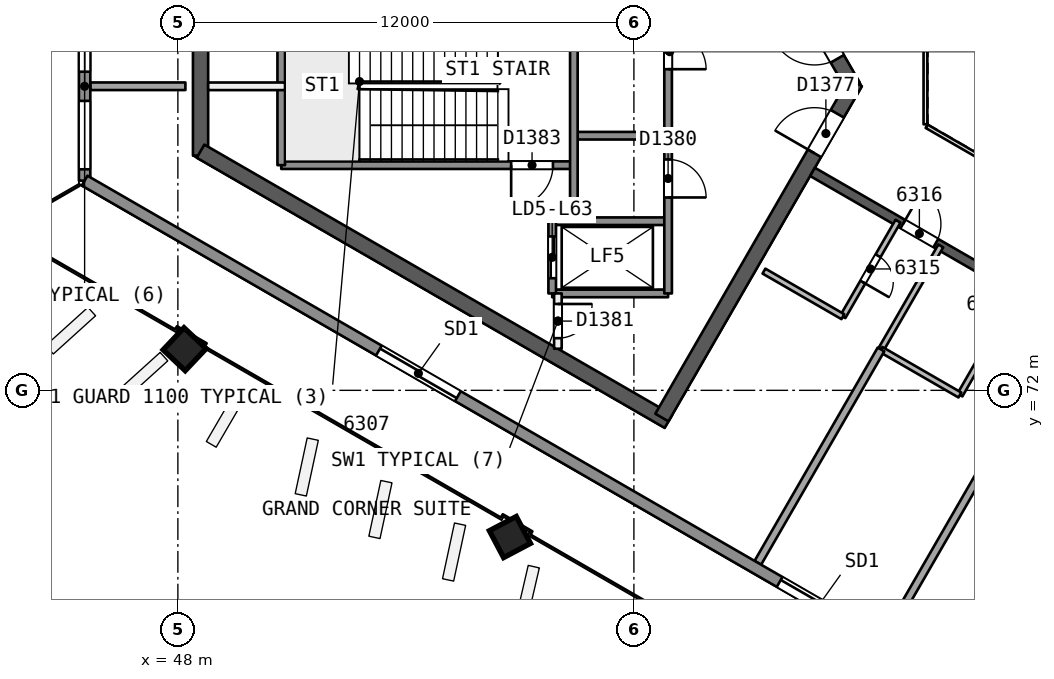
"""IFC4 building model, lengths in metres.
Left out: names, types, materials, properties, quantities, classifications, styles, units other than length and angle.
Written with IfcOpenShell. Run it as: python <this file> out.ifc"""

import sys

from ifc_helpers import new_model, si_unit, direction, frame, frame_2d, origin, origin_2d, place, context, subcontext, project, spatial, rectangle, extrude, element, fill, save


model = new_model("IFC4")
c1 = context("Model", 3, precision=1e-05, world=origin(), true_north=direction((0.0, 1.0)))
c2 = subcontext(c1, "Body", "Model", "MODEL_VIEW")
j1 = project(units=[si_unit("LENGTHUNIT", "METRE"), si_unit("PLANEANGLEUNIT", "RADIAN")], contexts=[c1])
p1 = place(None, origin())
s1 = spatial("IfcSite", under=j1, at=p1, CompositionType="ELEMENT")
p2 = place(p1, origin())
s2 = spatial("IfcBuilding", under=s1, at=p2, CompositionType="ELEMENT")
p3 = place(p2, frame((0.0, 0.0, 259.0)))
s3 = spatial("IfcBuildingStorey", under=s2, at=p3, CompositionType="ELEMENT", Elevation=259.0)
p4 = place(p3, frame((65.769, 80.0, 0.0), z_axis=(0.0, 0.0, 1.0), x_axis=(-0.50000177223, 0.866024380585, 0.0)))
e1 = element("IfcWall", 1, at=p4, inside=s3, PredefinedType="SHEAR", context=c2, shape_type="SweptSolid", body=[
    extrude(rectangle(XDim=10.265, YDim=0.4, at=frame_2d((5.132, 0.0))), origin(), (0.0, 0.0, 1.0), 3.7),
])
p5 = place(p4, frame((0.834, 0.0, 0.0)))
e2 = element("IfcOpeningElement", 2, at=p5, cuts=e1, PredefinedType="OPENING", context=c2, shape_type="SweptSolid", body=[
    extrude(rectangle(XDim=1.2, YDim=2.1, at=frame_2d((0.6, 1.05))), frame((0.0, 0.21, 0.0), z_axis=(0.0, -1.0, 0.0), x_axis=(1.0, 0.0, 0.0)), (0.0, 0.0, 1.0), 0.421),
])
p6 = place(p3, frame((48.597, 81.707, 0.0), z_axis=(0.0, 0.0, 1.0), x_axis=(0.0, -1.0, 0.0)))
e3 = element("IfcWall", 3, at=p6, inside=s3, PredefinedType="SHEAR", context=c2, shape_type="SweptSolid", body=[
    extrude(rectangle(XDim=3.53, YDim=0.4, at=frame_2d((1.765, 0.0))), origin(), (0.0, 0.0, 1.0), 3.7),
])
p7 = place(p3, frame((48.597, 78.293, 0.0), z_axis=(0.0, 0.0, 1.0), x_axis=(0.866026024469, -0.499998924941, 0.0)))
e4 = element("IfcWall", 4, at=p7, inside=s3, PredefinedType="SHEAR", context=c2, shape_type="SweptSolid", body=[
    extrude(rectangle(XDim=14.218, YDim=0.4, at=frame_2d((7.109, 0.0))), origin(), (0.0, 0.0, 1.0), 3.7),
])
p8 = place(p3, frame((60.737, 71.284, 0.0), z_axis=(0.0, 0.0, 1.0), x_axis=(0.50000547566, 0.866022242388, 0.0)))
e5 = element("IfcWall", 5, at=p8, inside=s3, PredefinedType="SHEAR", context=c2, shape_type="SweptSolid", body=[
    extrude(rectangle(XDim=10.18, YDim=0.4, at=frame_2d((5.09, 0.0))), origin(), (0.0, 0.0, 1.0), 3.7),
])
p9 = place(p8, frame((8.03, 0.0, 0.0)))
e6 = element("IfcOpeningElement", 6, at=p9, cuts=e5, PredefinedType="OPENING", context=c2, shape_type="SweptSolid", body=[
    extrude(rectangle(XDim=1.2, YDim=2.1, at=frame_2d((0.6, 1.05))), frame((0.0, 0.21, 0.0), z_axis=(0.0, -1.0, 0.0), x_axis=(1.0, 0.0, 0.0)), (0.0, 0.0, 1.0), 0.421),
])
p10 = place(p3, frame((64.7, 77.748, 0.0), z_axis=(0.0, 0.0, 1.0), x_axis=(0.866026492143, -0.499998114903, 0.0)))
e7 = element("IfcWall", 7, at=p10, inside=s3, PredefinedType="SHEAR", context=c2, shape_type="SweptSolid", body=[
    extrude(rectangle(XDim=15.588, YDim=0.25, at=frame_2d((7.794, 0.0))), origin(), (0.0, 0.0, 1.0), 3.3),
])
p11 = place(p10, frame((2.747, 0.0, 0.0)))
e8 = element("IfcOpeningElement", 8, at=p11, cuts=e7, PredefinedType="OPENING", context=c2, shape_type="SweptSolid", body=[
    extrude(rectangle(XDim=1.0, YDim=2.1, at=frame_2d((0.5, 1.05))), frame((0.0, 0.135, 0.0), z_axis=(0.0, -1.0, 0.0), x_axis=(1.0, 0.0, 0.0)), (0.0, 0.0, 1.0), 0.271),
])
p12 = place(p10, frame((6.544, 0.0, 0.0)))
e9 = element("IfcOpeningElement", 9, at=p12, cuts=e7, PredefinedType="OPENING", context=c2, shape_type="SweptSolid", body=[
    extrude(rectangle(XDim=1.0, YDim=2.1, at=frame_2d((0.5, 1.05))), frame((0.0, 0.135, 0.0), z_axis=(0.0, -1.0, 0.0), x_axis=(1.0, 0.0, 0.0)), (0.0, 0.0, 1.0), 0.271),
])
p13 = place(p10, frame((10.441, 0.0, 0.0)))
e10 = element("IfcOpeningElement", 10, at=p13, cuts=e7, PredefinedType="OPENING", context=c2, shape_type="SweptSolid", body=[
    extrude(rectangle(XDim=1.0, YDim=2.1, at=frame_2d((0.5, 1.05))), frame((0.0, 0.135, 0.0), z_axis=(0.0, -1.0, 0.0), x_axis=(1.0, 0.0, 0.0)), (0.0, 0.0, 1.0), 0.271),
])
p14 = place(p10, frame((11.841, 0.0, 0.0)))
e11 = element("IfcOpeningElement", 11, at=p14, cuts=e7, PredefinedType="OPENING", context=c2, shape_type="SweptSolid", body=[
    extrude(rectangle(XDim=1.0, YDim=2.1, at=frame_2d((0.5, 1.05))), frame((0.0, 0.135, 0.0), z_axis=(0.0, -1.0, 0.0), x_axis=(1.0, 0.0, 0.0)), (0.0, 0.0, 1.0), 0.271),
])
p15 = place(p3, frame((48.143, 73.074, 0.0), z_axis=(0.028559101991, 0.006859460986, 0.999568569678), x_axis=(-0.866414848315, 0.498869008806, 0.021331260469)))
e12 = element("IfcColumn", 12, at=p15, inside=s3, PredefinedType="COLUMN", context=c2, shape_type="SweptSolid", body=[
    extrude(rectangle(XDim=0.8, YDim=0.8, at=origin_2d()), origin(), (0.0, 0.0, 1.0), 3.702),
])
p16 = place(p3, frame((56.715, 68.125, 0.0), z_axis=(0.019328501455, 0.012204002625, 0.999738701537), x_axis=(-0.866906106124, 0.498357109285, 0.010676834304)))
e13 = element("IfcColumn", 13, at=p16, inside=s3, PredefinedType="COLUMN", context=c2, shape_type="SweptSolid", body=[
    extrude(rectangle(XDim=0.8, YDim=0.8, at=origin_2d()), origin(), (0.0, 0.0, 1.0), 3.701),
])
p17 = place(p3, frame((45.695, 80.001, 0.0), z_axis=(0.0, 0.0, 1.0), x_axis=(1.0, 0.0, 0.0)))
e14 = element("IfcWall", 14, at=p17, inside=s3, PredefinedType="PARTITIONING", context=c2, shape_type="SweptSolid", body=[
    extrude(rectangle(XDim=2.503, YDim=0.2, at=frame_2d((1.251, 0.0))), origin(), (0.0, 0.0, 1.0), 3.3),
])
p18 = place(p3, frame((66.949, 76.45, 0.0), z_axis=(0.0, 0.0, 1.0), x_axis=(-0.499987231761, -0.866032775405, 0.0)))
e15 = element("IfcWall", 15, at=p18, inside=s3, PredefinedType="PARTITIONING", context=c2, shape_type="SweptSolid", body=[
    extrude(rectangle(XDim=2.9, YDim=0.15, at=frame_2d((1.45, 0.0))), origin(), (0.0, 0.0, 1.0), 3.3),
])
p19 = place(p18, frame((1.05, 0.0, 0.0)))
e16 = element("IfcOpeningElement", 16, at=p19, cuts=e15, PredefinedType="OPENING", context=c2, shape_type="SweptSolid", body=[
    extrude(rectangle(XDim=0.8, YDim=2.1, at=frame_2d((0.4, 1.05))), frame((0.0, 0.085, 0.0), z_axis=(0.0, -1.0, 0.0), x_axis=(1.0, 0.0, 0.0)), (0.0, 0.0, 1.0), 0.171),
])
p20 = place(p3, frame((65.499, 73.938, 0.0), z_axis=(0.0, 0.0, 1.0), x_axis=(-0.866004188936, 0.500036743394, 0.0)))
e17 = element("IfcWall", 17, at=p20, inside=s3, PredefinedType="PARTITIONING", context=c2, shape_type="SweptSolid", body=[
    extrude(rectangle(XDim=2.398, YDim=0.15, at=frame_2d((1.199, 0.0))), origin(), (0.0, 0.0, 1.0), 3.3),
])
p21 = place(p3, frame((63.261, 67.462, 0.0), z_axis=(0.0, 0.0, 1.0), x_axis=(0.499983274767, 0.866035059887, 0.0)))
e18 = element("IfcWall", 18, at=p21, inside=s3, PredefinedType="PARTITIONING", context=c2, shape_type="SweptSolid", body=[
    extrude(rectangle(XDim=6.482, YDim=0.2, at=frame_2d((3.241, 0.0))), origin(), (0.0, 0.0, 1.0), 3.3),
])
p22 = place(p3, frame((66.502, 73.076, 0.0), z_axis=(0.0, 0.0, 1.0), x_axis=(0.499995674689, 0.86602790099, 0.0)))
e19 = element("IfcWall", 19, at=p22, inside=s3, PredefinedType="PARTITIONING", context=c2, shape_type="SweptSolid", body=[
    extrude(rectangle(XDim=3.146, YDim=0.15, at=frame_2d((1.573, 0.0))), origin(), (0.0, 0.0, 1.0), 3.3),
])
p23 = place(p3, frame((70.151, 74.601, 0.0), z_axis=(0.0, 0.0, 1.0), x_axis=(-0.499995674689, -0.86602790099, 0.0)))
e20 = element("IfcWall", 20, at=p23, inside=s3, PredefinedType="PARTITIONING", context=c2, shape_type="SweptSolid", body=[
    extrude(rectangle(XDim=3.146, YDim=0.15, at=frame_2d((1.573, 0.0))), origin(), (0.0, 0.0, 1.0), 3.3),
])
p24 = place(p23, frame((1.173, 0.0, 0.0)))
e21 = element("IfcOpeningElement", 21, at=p24, cuts=e20, PredefinedType="OPENING", context=c2, shape_type="SweptSolid", body=[
    extrude(rectangle(XDim=0.8, YDim=2.1, at=frame_2d((0.4, 1.05))), frame((0.0, 0.085, 0.0), z_axis=(0.0, -1.0, 0.0), x_axis=(1.0, 0.0, 0.0)), (0.0, 0.0, 1.0), 0.171),
])
p25 = place(p3, frame((68.578, 71.877, 0.0), z_axis=(0.0, 0.0, 1.0), x_axis=(-0.866034636017, 0.499984008963, 0.0)))
e22 = element("IfcWall", 22, at=p25, inside=s3, PredefinedType="PARTITIONING", context=c2, shape_type="SweptSolid", body=[
    extrude(rectangle(XDim=2.397, YDim=0.15, at=frame_2d((1.198, 0.0))), origin(), (0.0, 0.0, 1.0), 3.3),
])
p26 = place(p3, frame((66.636, 65.513, 0.0), z_axis=(0.0, 0.0, 1.0), x_axis=(0.499983274767, 0.866035059887, 0.0)))
e23 = element("IfcWall", 23, at=p26, inside=s3, PredefinedType="PARTITIONING", context=c2, shape_type="SweptSolid", body=[
    extrude(rectangle(XDim=6.482, YDim=0.2, at=frame_2d((3.241, 0.0))), origin(), (0.0, 0.0, 1.0), 3.3),
])
p27 = place(p3, frame((45.546, 77.518, 0.0), z_axis=(0.0, 0.0, 1.0), x_axis=(0.0, 1.0, 0.0)))
e24 = element("IfcWall", 24, at=p27, inside=s3, PredefinedType="SOLIDWALL", context=c2, shape_type="SweptSolid", body=[
    extrude(rectangle(XDim=4.965, YDim=0.3, at=frame_2d((2.482, 0.0))), origin(), (0.0, 0.0, 1.0), 3.3),
])
p28 = place(p27, frame((2.866, 0.0, 0.9)))
e25 = element("IfcOpeningElement", 25, at=p28, cuts=e24, PredefinedType="OPENING", context=c2, shape_type="SweptSolid", body=[
    extrude(rectangle(XDim=1.8, YDim=1.5, at=frame_2d((0.9, 0.75))), frame((0.0, 0.161, 0.0), z_axis=(0.0, -1.0, 0.0), x_axis=(1.0, 0.0, 0.0)), (0.0, 0.0, 1.0), 0.321),
])
p29 = place(p27, frame((0.298, 0.0, 0.9)))
e26 = element("IfcOpeningElement", 26, at=p29, cuts=e24, PredefinedType="OPENING", context=c2, shape_type="SweptSolid", body=[
    extrude(rectangle(XDim=1.8, YDim=1.5, at=frame_2d((0.9, 0.75))), frame((0.0, 0.161, 0.0), z_axis=(0.0, -1.0, 0.0), x_axis=(1.0, 0.0, 0.0)), (0.0, 0.0, 1.0), 0.321),
])
p30 = place(p3, frame((87.577, 53.251, 0.0), z_axis=(0.0, 0.0, 1.0), x_axis=(-0.86602550179, 0.499999830249, 0.0)))
e27 = element("IfcWall", 27, at=p30, inside=s3, PredefinedType="SOLIDWALL", context=c2, shape_type="SweptSolid", body=[
    extrude(rectangle(XDim=48.533, YDim=0.3, at=frame_2d((24.267, 0.0))), origin(), (0.0, 0.0, 1.0), 3.3),
])
p31 = place(p30, frame((37.192, 0.0, 0.0)))
e28 = element("IfcOpeningElement", 28, at=p31, cuts=e27, PredefinedType="OPENING", context=c2, shape_type="SweptSolid", body=[
    extrude(rectangle(XDim=2.4, YDim=2.4, at=frame_2d((1.2, 1.2))), frame((0.0, 0.161, 0.0), z_axis=(0.0, -1.0, 0.0), x_axis=(1.0, 0.0, 0.0)), (0.0, 0.0, 1.0), 0.321),
])
p32 = place(p30, frame((8.941, 0.0, 0.0)))
e29 = element("IfcOpeningElement", 29, at=p32, cuts=e27, PredefinedType="OPENING", context=c2, shape_type="SweptSolid", body=[
    extrude(rectangle(XDim=2.4, YDim=2.4, at=frame_2d((1.2, 1.2))), frame((0.0, 0.161, 0.0), z_axis=(0.0, -1.0, 0.0), x_axis=(1.0, 0.0, 0.0)), (0.0, 0.0, 1.0), 0.321),
])
p33 = place(p30, frame((25.015, 0.0, 0.0)))
e30 = element("IfcOpeningElement", 30, at=p33, cuts=e27, PredefinedType="OPENING", context=c2, shape_type="SweptSolid", body=[
    extrude(rectangle(XDim=2.4, YDim=2.4, at=frame_2d((1.2, 1.2))), frame((0.0, 0.161, 0.0), z_axis=(0.0, -1.0, 0.0), x_axis=(1.0, 0.0, 0.0)), (0.0, 0.0, 1.0), 0.321),
])
p34 = place(p30, frame((21.118, 0.0, 0.0)))
e31 = element("IfcOpeningElement", 31, at=p34, cuts=e27, PredefinedType="OPENING", context=c2, shape_type="SweptSolid", body=[
    extrude(rectangle(XDim=2.4, YDim=2.4, at=frame_2d((1.2, 1.2))), frame((0.0, 0.161, 0.0), z_axis=(0.0, -1.0, 0.0), x_axis=(1.0, 0.0, 0.0)), (0.0, 0.0, 1.0), 0.321),
])
p35 = place(p3, frame((50.82, 80.0, 0.0), z_axis=(0.0, 0.0, 1.0), x_axis=(-1.0, 0.0, 0.0)))
e32 = element("IfcWall", 32, at=p35, inside=s3, PredefinedType="PARTITIONING", context=c2, shape_type="SweptSolid", body=[
    extrude(rectangle(XDim=2.023, YDim=0.2, at=frame_2d((1.012, 0.0))), origin(), (0.0, 0.0, 1.0), 3.3),
])
p36 = place(p3, frame((60.9, 78.7, 0.0), z_axis=(0.0, 0.0, 1.0), x_axis=(-1.0, 0.0, 0.0)))
e33 = element("IfcWall", 33, at=p36, inside=s3, PredefinedType="SOLIDWALL", context=c2, shape_type="SweptSolid", body=[
    extrude(rectangle(XDim=2.48, YDim=0.2, at=frame_2d((1.24, 0.0))), origin(), (0.0, 0.0, 1.0), 3.3),
])
p37 = place(p3, frame((58.42, 77.925, 0.0), z_axis=(0.0, 0.0, 1.0), x_axis=(-1.0, 0.0, 0.0)))
e34 = element("IfcWall", 34, at=p37, inside=s3, PredefinedType="SOLIDWALL", context=c2, shape_type="SweptSolid", body=[
    extrude(rectangle(XDim=7.7, YDim=0.2, at=frame_2d((3.85, 0.0))), origin(), (0.0, 0.0, 1.0), 3.3),
])
p38 = place(p37, frame((0.55, 0.0, 0.0)))
e35 = element("IfcOpeningElement", 35, at=p38, cuts=e34, PredefinedType="OPENING", context=c2, shape_type="SweptSolid", body=[
    extrude(rectangle(XDim=1.1, YDim=2.1, at=frame_2d((0.55, 1.05))), frame((0.0, 0.11, 0.0), z_axis=(0.0, -1.0, 0.0), x_axis=(1.0, 0.0, 0.0)), (0.0, 0.0, 1.0), 0.221),
])
for number, where, z_axis, x_axis in (
    (36, (60.9, 76.45, 0.0), (0.0, 0.0, 1.0), (-1.0, 0.0, 0.0)),
    (37, (60.9, 74.55, 0.0), (0.0, 0.0, 1.0), (-1.0, 0.0, 0.0)),
):
    element("IfcWall", number, at=place(p3, frame(where, z_axis=z_axis, x_axis=x_axis)), inside=s3, PredefinedType="SOLIDWALL", context=c2, shape_type="SweptSolid", body=[
        extrude(rectangle(XDim=3.05, YDim=0.2, at=frame_2d((1.525, 0.0))), origin(), (0.0, 0.0, 1.0), 3.3),
    ])
p39 = place(p3, frame((60.9, 85.45, 0.0), z_axis=(0.0, 0.0, 1.0), x_axis=(0.0, -1.0, 0.0)))
e38 = element("IfcWall", 38, at=p39, inside=s3, PredefinedType="SOLIDWALL", context=c2, shape_type="SweptSolid", body=[
    extrude(rectangle(XDim=10.9, YDim=0.2, at=frame_2d((5.45, 0.0))), origin(), (0.0, 0.0, 1.0), 3.3),
])
p40 = place(p39, frame((0.625, 0.0, 0.0)))
e39 = element("IfcOpeningElement", 39, at=p40, cuts=e38, PredefinedType="OPENING", context=c2, shape_type="SweptSolid", body=[
    extrude(rectangle(XDim=1.0, YDim=2.1, at=frame_2d((0.5, 1.05))), frame((0.0, 0.11, 0.0), z_axis=(0.0, -1.0, 0.0), x_axis=(1.0, 0.0, 0.0)), (0.0, 0.0, 1.0), 0.221),
])
p41 = place(p39, frame((4.0, 0.0, 0.0)))
e40 = element("IfcOpeningElement", 40, at=p41, cuts=e38, PredefinedType="OPENING", context=c2, shape_type="SweptSolid", body=[
    extrude(rectangle(XDim=1.0, YDim=2.1, at=frame_2d((0.5, 1.05))), frame((0.0, 0.11, 0.0), z_axis=(0.0, -1.0, 0.0), x_axis=(1.0, 0.0, 0.0)), (0.0, 0.0, 1.0), 0.221),
])
p42 = place(p39, frame((7.375, 0.0, 0.0)))
e41 = element("IfcOpeningElement", 41, at=p42, cuts=e38, PredefinedType="OPENING", context=c2, shape_type="SweptSolid", body=[
    extrude(rectangle(XDim=1.0, YDim=2.1, at=frame_2d((0.5, 1.05))), frame((0.0, 0.11, 0.0), z_axis=(0.0, -1.0, 0.0), x_axis=(1.0, 0.0, 0.0)), (0.0, 0.0, 1.0), 0.221),
])
p43 = place(p3, frame((58.42, 87.148, 0.0), z_axis=(0.0, 0.0, 1.0), x_axis=(0.0, -1.0, 0.0)))
e42 = element("IfcWall", 42, at=p43, inside=s3, PredefinedType="SOLIDWALL", context=c2, shape_type="SweptSolid", body=[
    extrude(rectangle(XDim=10.698, YDim=0.2, at=frame_2d((5.349, 0.0))), origin(), (0.0, 0.0, 1.0), 3.3),
])
p44 = place(p43, frame((0.399, 0.0, 0.0)))
e43 = element("IfcOpeningElement", 43, at=p44, cuts=e42, PredefinedType="OPENING", context=c2, shape_type="SweptSolid", body=[
    extrude(rectangle(XDim=0.9, YDim=2.1, at=frame_2d((0.45, 1.05))), frame((0.0, 0.11, 0.0), z_axis=(0.0, -1.0, 0.0), x_axis=(1.0, 0.0, 0.0)), (0.0, 0.0, 1.0), 0.221),
])
p45 = place(p3, frame((58.0, 74.55, 0.0), z_axis=(0.0, 0.0, 1.0), x_axis=(0.0, -1.0, 0.0)))
e44 = element("IfcWall", 44, at=p45, inside=s3, PredefinedType="PARTITIONING", context=c2, shape_type="SweptSolid", body=[
    extrude(rectangle(XDim=1.455, YDim=0.2, at=frame_2d((0.728, 0.0))), origin(), (0.0, 0.0, 1.0), 3.3),
])
p46 = place(p45, frame((0.278, 0.0, 0.0)))
e45 = element("IfcOpeningElement", 45, at=p46, cuts=e44, PredefinedType="OPENING", context=c2, shape_type="SweptSolid", body=[
    extrude(rectangle(XDim=0.9, YDim=2.1, at=frame_2d((0.45, 1.05))), frame((0.0, 0.11, 0.0), z_axis=(0.0, -1.0, 0.0), x_axis=(1.0, 0.0, 0.0)), (0.0, 0.0, 1.0), 0.221),
])
p47 = place(p3, frame((57.85, 76.45, 0.0), z_axis=(0.0, 0.0, 1.0), x_axis=(0.0, -1.0, 0.0)))
e46 = element("IfcWall", 46, at=p47, inside=s3, PredefinedType="SOLIDWALL", context=c2, shape_type="SweptSolid", body=[
    extrude(rectangle(XDim=1.9, YDim=0.2, at=frame_2d((0.95, 0.0))), origin(), (0.0, 0.0, 1.0), 3.3),
])
p48 = place(p47, frame((0.4, 0.0, 0.0)))
e47 = element("IfcOpeningElement", 47, at=p48, cuts=e46, PredefinedType="OPENING", context=c2, shape_type="SweptSolid", body=[
    extrude(rectangle(XDim=1.1, YDim=2.1, at=frame_2d((0.55, 1.05))), frame((0.0, 0.11, 0.0), z_axis=(0.0, -1.0, 0.0), x_axis=(1.0, 0.0, 0.0)), (0.0, 0.0, 1.0), 0.221),
])
p49 = place(p3, frame((50.72, 82.075, 0.0), z_axis=(0.0, 0.0, 1.0), x_axis=(0.0, -1.0, 0.0)))
e48 = element("IfcWall", 48, at=p49, inside=s3, PredefinedType="SOLIDWALL", context=c2, shape_type="SweptSolid", body=[
    extrude(rectangle(XDim=4.15, YDim=0.2, at=frame_2d((2.075, 0.0))), origin(), (0.0, 0.0, 1.0), 3.3),
])
p50 = place(p3, frame((67.672, 81.0, 0.0), z_axis=(0.0, 0.0, 1.0), x_axis=(0.0, -1.0, 0.0)))
e49 = element("IfcWall", 49, at=p50, inside=s3, PredefinedType="PARTITIONING", context=c2, shape_type="SweptSolid", body=[
    extrude(rectangle(XDim=2.0, YDim=0.1, at=frame_2d((1.0, 0.0))), origin(), (0.0, 0.0, 1.0), 3.3),
])
p51 = place(p3, frame((67.702, 78.948, 0.0), z_axis=(0.0, 0.0, 1.0), x_axis=(0.866026658274, -0.499997827154, 0.0)))
e50 = element("IfcWall", 50, at=p51, inside=s3, PredefinedType="PARTITIONING", context=c2, shape_type="SweptSolid", body=[
    extrude(rectangle(XDim=11.588, YDim=0.1, at=frame_2d((5.794, 0.0))), origin(), (0.0, 0.0, 1.0), 3.3),
])
p52 = place(p19, origin())
e51 = element("IfcDoor", 51, at=p52, inside=s3, OperationType="SINGLE_SWING_RIGHT", PredefinedType="NOTDEFINED", context=c2, shape_type="SweptSolid", body=[
    extrude(rectangle(XDim=0.8, YDim=2.1, at=frame_2d((0.4, 1.05))), frame((0.0, 0.025, 0.0), z_axis=(0.0, -1.0, 0.0), x_axis=(1.0, 0.0, 0.0)), (0.0, 0.0, 1.0), 0.05),
])
fill(e16, e51)
p53 = place(p11, origin())
e52 = element("IfcDoor", 52, at=p53, inside=s3, OperationType="SINGLE_SWING_LEFT", PredefinedType="NOTDEFINED", context=c2, shape_type="SweptSolid", body=[
    extrude(rectangle(XDim=1.0, YDim=2.1, at=frame_2d((0.5, 1.05))), frame((0.0, 0.025, 0.0), z_axis=(0.0, -1.0, 0.0), x_axis=(1.0, 0.0, 0.0)), (0.0, 0.0, 1.0), 0.05),
])
fill(e8, e52)
p54 = place(p28, origin())
e53 = element("IfcWindow", 53, at=p54, inside=s3, PartitioningType="SINGLE_PANEL", PredefinedType="WINDOW", context=c2, shape_type="SweptSolid", body=[
    extrude(rectangle(XDim=1.8, YDim=1.5, at=frame_2d((0.9, 0.75))), frame((0.0, 0.03, 0.0), z_axis=(0.0, -1.0, 0.0), x_axis=(1.0, 0.0, 0.0)), (0.0, 0.0, 1.0), 0.06),
])
fill(e25, e53)
p55 = place(p29, origin())
e54 = element("IfcWindow", 54, at=p55, inside=s3, PartitioningType="SINGLE_PANEL", PredefinedType="WINDOW", context=c2, shape_type="SweptSolid", body=[
    extrude(rectangle(XDim=1.8, YDim=1.5, at=frame_2d((0.9, 0.75))), frame((0.0, 0.03, 0.0), z_axis=(0.0, -1.0, 0.0), x_axis=(1.0, 0.0, 0.0)), (0.0, 0.0, 1.0), 0.06),
])
fill(e26, e54)
p56 = place(p31, origin())
e55 = element("IfcDoor", 55, at=p56, inside=s3, OperationType="SLIDING_TO_LEFT", PredefinedType="NOTDEFINED", context=c2, shape_type="SweptSolid", body=[
    extrude(rectangle(XDim=2.4, YDim=2.4, at=frame_2d((1.2, 1.2))), frame((0.0, 0.025, 0.0), z_axis=(0.0, -1.0, 0.0), x_axis=(1.0, 0.0, 0.0)), (0.0, 0.0, 1.0), 0.05),
])
fill(e28, e55)
p57 = place(p33, origin())
e56 = element("IfcDoor", 56, at=p57, inside=s3, OperationType="SLIDING_TO_LEFT", PredefinedType="NOTDEFINED", context=c2, shape_type="SweptSolid", body=[
    extrude(rectangle(XDim=2.4, YDim=2.4, at=frame_2d((1.2, 1.2))), frame((0.0, 0.025, 0.0), z_axis=(0.0, -1.0, 0.0), x_axis=(1.0, 0.0, 0.0)), (0.0, 0.0, 1.0), 0.05),
])
fill(e30, e56)
p58 = place(p5, origin())
e57 = element("IfcDoor", 57, at=p58, inside=s3, OperationType="SINGLE_SWING_RIGHT", PredefinedType="NOTDEFINED", context=c2, shape_type="SweptSolid", body=[
    extrude(rectangle(XDim=1.2, YDim=2.1, at=frame_2d((0.6, 1.05))), frame((0.0, 0.025, 0.0), z_axis=(0.0, -1.0, 0.0), x_axis=(1.0, 0.0, 0.0)), (0.0, 0.0, 1.0), 0.05),
])
fill(e2, e57)
p59 = place(p9, origin())
e58 = element("IfcDoor", 58, at=p59, inside=s3, OperationType="SINGLE_SWING_LEFT", PredefinedType="NOTDEFINED", context=c2, shape_type="SweptSolid", body=[
    extrude(rectangle(XDim=1.2, YDim=2.1, at=frame_2d((0.6, 1.05))), frame((0.0, 0.025, 0.0), z_axis=(0.0, -1.0, 0.0), x_axis=(1.0, 0.0, 0.0)), (0.0, 0.0, 1.0), 0.05),
])
fill(e6, e58)
p60 = place(p48, origin())
e59 = element("IfcDoor", 59, at=p60, inside=s3, OperationType="SLIDING_TO_RIGHT", PredefinedType="NOTDEFINED", context=c2, shape_type="SweptSolid", body=[
    extrude(rectangle(XDim=1.1, YDim=2.1, at=frame_2d((0.55, 1.05))), frame((0.0, 0.025, 0.0), z_axis=(0.0, -1.0, 0.0), x_axis=(1.0, 0.0, 0.0)), (0.0, 0.0, 1.0), 0.05),
])
fill(e47, e59)
p61 = place(p41, origin())
e60 = element("IfcDoor", 60, at=p61, inside=s3, OperationType="SINGLE_SWING_RIGHT", PredefinedType="NOTDEFINED", context=c2, shape_type="SweptSolid", body=[
    extrude(rectangle(XDim=1.0, YDim=2.1, at=frame_2d((0.5, 1.05))), frame((0.0, 0.025, 0.0), z_axis=(0.0, -1.0, 0.0), x_axis=(1.0, 0.0, 0.0)), (0.0, 0.0, 1.0), 0.05),
])
fill(e40, e60)
p62 = place(p42, origin())
e61 = element("IfcDoor", 61, at=p62, inside=s3, OperationType="SINGLE_SWING_RIGHT", PredefinedType="NOTDEFINED", context=c2, shape_type="SweptSolid", body=[
    extrude(rectangle(XDim=1.0, YDim=2.1, at=frame_2d((0.5, 1.05))), frame((0.0, 0.025, 0.0), z_axis=(0.0, -1.0, 0.0), x_axis=(1.0, 0.0, 0.0)), (0.0, 0.0, 1.0), 0.05),
])
fill(e41, e61)
p63 = place(p46, origin())
e62 = element("IfcDoor", 62, at=p63, inside=s3, OperationType="SINGLE_SWING_LEFT", PredefinedType="NOTDEFINED", context=c2, shape_type="SweptSolid", body=[
    extrude(rectangle(XDim=0.9, YDim=2.1, at=frame_2d((0.45, 1.05))), frame((0.0, 0.025, 0.0), z_axis=(0.0, -1.0, 0.0), x_axis=(1.0, 0.0, 0.0)), (0.0, 0.0, 1.0), 0.05),
])
fill(e45, e62)
p64 = place(p38, origin())
e63 = element("IfcDoor", 63, at=p64, inside=s3, OperationType="SINGLE_SWING_RIGHT", PredefinedType="NOTDEFINED", context=c2, shape_type="SweptSolid", body=[
    extrude(rectangle(XDim=1.1, YDim=2.1, at=frame_2d((0.55, 1.05))), frame((0.0, 0.025, 0.0), z_axis=(0.0, -1.0, 0.0), x_axis=(1.0, 0.0, 0.0)), (0.0, 0.0, 1.0), 0.05),
])
fill(e35, e63)
save(model, sys.argv[1])
